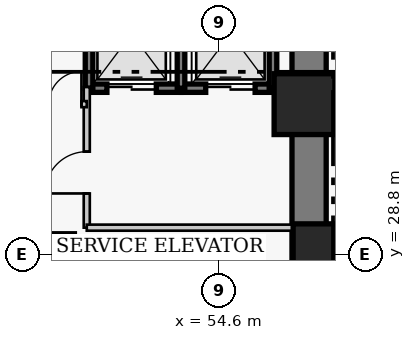
"""IFC4 building model, lengths in metres.
Left out: names, types, materials, properties, quantities, classifications, styles, units other than length and angle.
Written with IfcOpenShell. Run it as: python <this file> out.ifc"""

import sys

from ifc_helpers import new_model, si_unit, direction, frame, frame_2d, origin, origin_2d, place, context, subcontext, project, spatial, rectangle, extrude, element, fill, save


model = new_model("IFC4")
c1 = context("Model", 3, precision=1e-05, world=origin(), true_north=direction((0.0, 1.0)))
c2 = subcontext(c1, "Body", "Model", "MODEL_VIEW")
j1 = project(units=[si_unit("LENGTHUNIT", "METRE"), si_unit("PLANEANGLEUNIT", "RADIAN")], contexts=[c1])
p1 = place(None, origin())
s1 = spatial("IfcSite", under=j1, at=p1, CompositionType="ELEMENT")
p2 = place(p1, origin())
s2 = spatial("IfcBuilding", under=s1, at=p2, CompositionType="ELEMENT")
p3 = place(p2, frame((0.0, 0.0, 41.2)))
s3 = spatial("IfcBuildingStorey", under=s2, at=p3, CompositionType="ELEMENT", Elevation=41.2)
p4 = place(p3, frame((56.97, 27.05, 0.0), z_axis=(0.0, 0.0, 1.0), x_axis=(0.0, 1.0, 0.0)))
e1 = element("IfcWall", 1, at=p4, inside=s3, PredefinedType="SHEAR", context=c2, shape_type="SweptSolid", body=[
    extrude(rectangle(XDim=13.72, YDim=0.9, at=frame_2d((6.86, 0.0))), origin(), (0.0, 0.0, 1.0), 3.8),
])
for number, where, z_axis, x_axis in (
    (2, (57.35, 28.8, 0.0), (0.0, 0.0, 1.0), (1.0, 0.0, 0.0)),
    (3, (56.85, 32.75, 0.0), (0.0, 0.0, 1.0), (1.0, 0.0, 0.0)),
):
    element("IfcColumn", number, at=place(p3, frame(where, z_axis=z_axis, x_axis=x_axis)), inside=s3, PredefinedType="COLUMN", context=c2, shape_type="SweptSolid", body=[
        extrude(rectangle(XDim=1.6, YDim=1.6, at=origin_2d()), origin(), (0.0, 0.0, 1.0), 3.8),
    ])
p5 = place(p3, frame((48.55, 29.23, 0.0), z_axis=(0.0, 0.0, 1.0), x_axis=(1.0, 0.0, 0.0)))
e4 = element("IfcWall", 4, at=p5, inside=s3, PredefinedType="SHEAR", context=c2, shape_type="SweptSolid", body=[
    extrude(rectangle(XDim=2.245, YDim=0.22, at=frame_2d((1.123, 0.0))), origin(), (0.0, 0.0, 1.0), 3.8),
])
p6 = place(p3, frame((50.795, 27.17, 0.0), z_axis=(0.0, 0.0, 1.0), x_axis=(0.0, 1.0, 0.0)))
e5 = element("IfcWall", 5, at=p6, inside=s3, PredefinedType="SHEAR", context=c2, shape_type="SweptSolid", body=[
    extrude(rectangle(XDim=2.06, YDim=0.2, at=frame_2d((1.03, 0.0))), origin(), (0.0, 0.0, 1.0), 3.8),
])
p7 = place(p3, frame((51.18, 33.17, 0.0), z_axis=(0.0, 0.0, 1.0), x_axis=(1.0, 0.0, 0.0)))
e6 = element("IfcWall", 6, at=p7, inside=s3, PredefinedType="SHEAR", context=c2, shape_type="SweptSolid", body=[
    extrude(rectangle(XDim=2.42, YDim=0.22, at=frame_2d((1.21, 0.0))), origin(), (0.0, 0.0, 1.0), 3.8),
])
p8 = place(p7, frame((0.47, 0.0, 0.0)))
e7 = element("IfcOpeningElement", 7, at=p8, cuts=e6, PredefinedType="OPENING", context=c2, shape_type="SweptSolid", body=[
    extrude(rectangle(XDim=1.3, YDim=2.15, at=frame_2d((0.65, 1.075))), frame((0.0, 0.12, 0.0), z_axis=(0.0, -1.0, 0.0), x_axis=(1.0, 0.0, 0.0)), (0.0, 0.0, 1.0), 0.24),
])
p9 = place(p3, frame((51.18, 33.17, 0.0), z_axis=(0.0, 0.0, 1.0), x_axis=(0.0, 1.0, 0.0)))
e8 = element("IfcWall", 8, at=p9, inside=s3, PredefinedType="SHEAR", context=c2, shape_type="SweptSolid", body=[
    extrude(rectangle(XDim=2.86, YDim=0.2, at=frame_2d((1.43, 0.0))), origin(), (0.0, 0.0, 1.0), 3.8),
])
p10 = place(p3, frame((53.6, 33.17, 0.0), z_axis=(0.0, 0.0, 1.0), x_axis=(1.0, 0.0, 0.0)))
e9 = element("IfcWall", 9, at=p10, inside=s3, PredefinedType="SHEAR", context=c2, shape_type="SweptSolid", body=[
    extrude(rectangle(XDim=2.42, YDim=0.22, at=frame_2d((1.21, 0.0))), origin(), (0.0, 0.0, 1.0), 3.8),
])
p11 = place(p10, frame((0.65, 0.0, 0.0)))
e10 = element("IfcOpeningElement", 10, at=p11, cuts=e9, PredefinedType="OPENING", context=c2, shape_type="SweptSolid", body=[
    extrude(rectangle(XDim=1.3, YDim=2.15, at=frame_2d((0.65, 1.075))), frame((0.0, 0.12, 0.0), z_axis=(0.0, -1.0, 0.0), x_axis=(1.0, 0.0, 0.0)), (0.0, 0.0, 1.0), 0.24),
])
for number, where, z_axis, x_axis in (
    (11, (53.6, 33.17, 0.0), (0.0, 0.0, 1.0), (0.0, 1.0, 0.0)),
    (12, (56.02, 33.17, 0.0), (0.0, 0.0, 1.0), (0.0, 1.0, 0.0)),
):
    element("IfcWall", number, at=place(p3, frame(where, z_axis=z_axis, x_axis=x_axis)), inside=s3, PredefinedType="SHEAR", context=c2, shape_type="SweptSolid", body=[
        extrude(rectangle(XDim=2.86, YDim=0.2, at=frame_2d((1.43, 0.0))), origin(), (0.0, 0.0, 1.0), 3.8),
    ])
p12 = place(p3, frame((51.12, 29.5, 0.0), z_axis=(0.0, 0.0, 1.0), x_axis=(0.0, 1.0, 0.0)))
e13 = element("IfcWall", 13, at=p12, inside=s3, PredefinedType="PARTITIONING", context=c2, shape_type="SweptSolid", body=[
    extrude(rectangle(XDim=3.7, YDim=0.16, at=frame_2d((1.85, 0.0))), origin(), (0.0, 0.0, 1.0), 3.54),
])
p13 = place(p12, frame((0.9, 0.0, 0.0)))
e14 = element("IfcOpeningElement", 14, at=p13, cuts=e13, PredefinedType="OPENING", context=c2, shape_type="SweptSolid", body=[
    extrude(rectangle(XDim=1.1, YDim=2.15, at=frame_2d((0.55, 1.075))), frame((0.0, 0.09, 0.0), z_axis=(0.0, -1.0, 0.0), x_axis=(1.0, 0.0, 0.0)), (0.0, 0.0, 1.0), 0.18),
])
p14 = place(p3, frame((51.12, 29.5, 0.0), z_axis=(0.0, 0.0, 1.0), x_axis=(1.0, 0.0, 0.0)))
e15 = element("IfcWall", 15, at=p14, inside=s3, PredefinedType="PARTITIONING", context=c2, shape_type="SweptSolid", body=[
    extrude(rectangle(XDim=5.63, YDim=0.16, at=frame_2d((2.815, 0.0))), origin(), (0.0, 0.0, 1.0), 3.54),
])
p15 = place(p3, frame((48.92, 32.75, 0.0), z_axis=(0.0, 0.0, 1.0), x_axis=(1.0, 0.0, 0.0)))
e16 = element("IfcWall", 16, at=p15, inside=s3, PredefinedType="PARTITIONING", context=c2, shape_type="SweptSolid", body=[
    extrude(rectangle(XDim=2.2, YDim=0.16, at=frame_2d((1.1, 0.0))), origin(), (0.0, 0.0, 1.0), 3.54),
])
p16 = place(p15, frame((0.14, 0.0, 0.0)))
e17 = element("IfcOpeningElement", 17, at=p16, cuts=e16, PredefinedType="OPENING", context=c2, shape_type="SweptSolid", body=[
    extrude(rectangle(XDim=0.86, YDim=2.05, at=frame_2d((0.43, 1.025))), frame((0.0, 0.09, 0.0), z_axis=(0.0, -1.0, 0.0), x_axis=(1.0, 0.0, 0.0)), (0.0, 0.0, 1.0), 0.18),
])
p17 = place(p15, frame((1.2, 0.0, 0.0)))
e18 = element("IfcOpeningElement", 18, at=p17, cuts=e16, PredefinedType="OPENING", context=c2, shape_type="SweptSolid", body=[
    extrude(rectangle(XDim=0.86, YDim=2.05, at=frame_2d((0.43, 1.025))), frame((0.0, 0.09, 0.0), z_axis=(0.0, -1.0, 0.0), x_axis=(1.0, 0.0, 0.0)), (0.0, 0.0, 1.0), 0.18),
])
p18 = place(p8, origin())
e19 = element("IfcDoor", 19, at=p18, inside=s3, OperationType="DOUBLE_DOOR_SLIDING", PredefinedType="DOOR", context=c2, shape_type="SweptSolid", body=[
    extrude(rectangle(XDim=1.3, YDim=2.15, at=frame_2d((0.65, 1.075))), frame((0.0, 0.025, 0.0), z_axis=(0.0, -1.0, 0.0), x_axis=(1.0, 0.0, 0.0)), (0.0, 0.0, 1.0), 0.05),
])
fill(e7, e19)
p19 = place(p11, origin())
e20 = element("IfcDoor", 20, at=p19, inside=s3, OperationType="DOUBLE_DOOR_SLIDING", PredefinedType="DOOR", context=c2, shape_type="SweptSolid", body=[
    extrude(rectangle(XDim=1.3, YDim=2.15, at=frame_2d((0.65, 1.075))), frame((0.0, 0.025, 0.0), z_axis=(0.0, -1.0, 0.0), x_axis=(1.0, 0.0, 0.0)), (0.0, 0.0, 1.0), 0.05),
])
fill(e10, e20)
p20 = place(p13, origin())
e21 = element("IfcDoor", 21, at=p20, inside=s3, OperationType="SINGLE_SWING_LEFT", PredefinedType="DOOR", context=c2, shape_type="SweptSolid", body=[
    extrude(rectangle(XDim=1.1, YDim=2.15, at=frame_2d((0.55, 1.075))), frame((0.0, 0.025, 0.0), z_axis=(0.0, -1.0, 0.0), x_axis=(1.0, 0.0, 0.0)), (0.0, 0.0, 1.0), 0.05),
])
fill(e14, e21)
p21 = place(p17, origin())
e22 = element("IfcDoor", 22, at=p21, inside=s3, OperationType="SINGLE_SWING_RIGHT", PredefinedType="DOOR", context=c2, shape_type="SweptSolid", body=[
    extrude(rectangle(XDim=0.86, YDim=2.05, at=frame_2d((0.43, 1.025))), frame((0.0, 0.025, 0.0), z_axis=(0.0, -1.0, 0.0), x_axis=(1.0, 0.0, 0.0)), (0.0, 0.0, 1.0), 0.05),
])
fill(e18, e22)
save(model, sys.argv[1])
